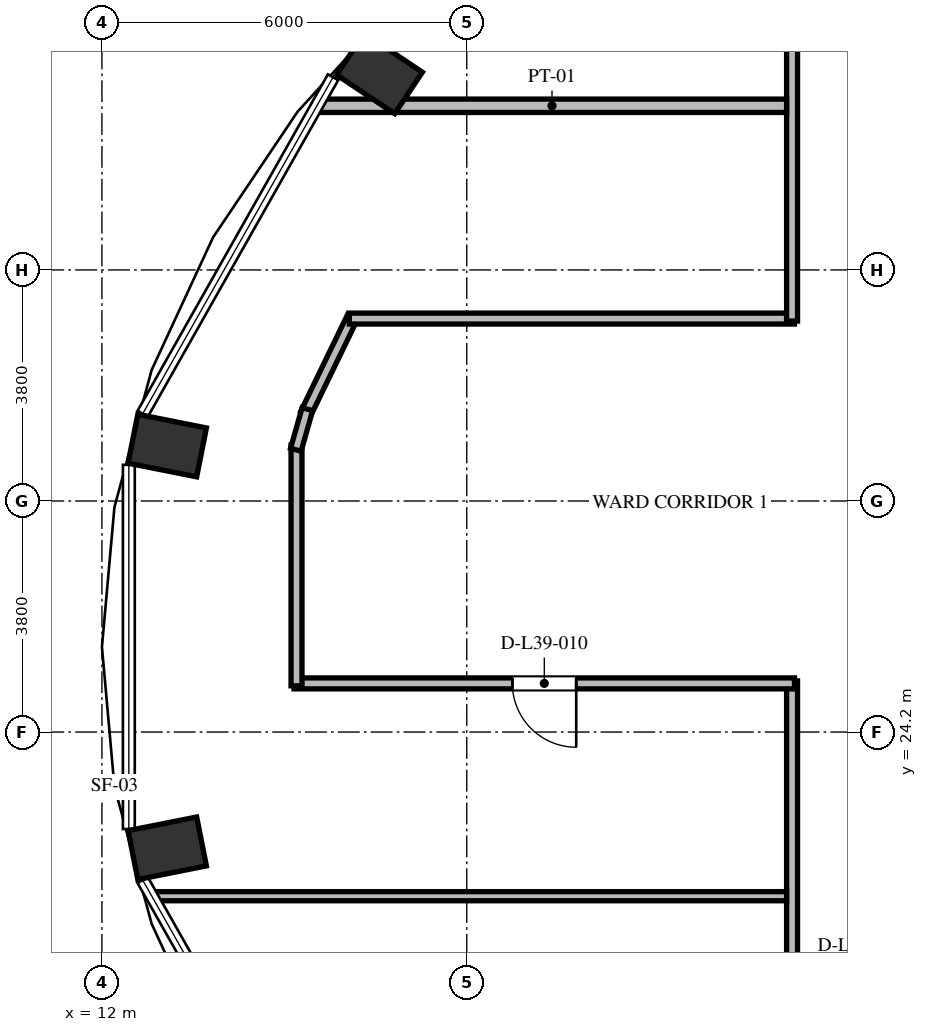
"""IFC4 building model, lengths in metres.
Left out: names, types, materials, properties, quantities, classifications, styles, units other than length and angle.
Written with IfcOpenShell. Run it as: python <this file> out.ifc"""

import sys

from ifc_helpers import new_model, si_unit, direction, frame, frame_2d, origin, origin_2d, place, context, subcontext, project, spatial, rectangle, extrude, element, fill, save


model = new_model("IFC4")
c1 = context("Model", 3, precision=1e-05, world=origin(), true_north=direction((0.0, 1.0)))
c2 = subcontext(c1, "Body", "Model", "MODEL_VIEW")
j1 = project(units=[si_unit("LENGTHUNIT", "METRE"), si_unit("PLANEANGLEUNIT", "RADIAN")], contexts=[c1])
p1 = place(None, origin())
s1 = spatial("IfcSite", under=j1, at=p1, CompositionType="ELEMENT")
p2 = place(p1, origin())
s2 = spatial("IfcBuilding", under=s1, at=p2, CompositionType="ELEMENT")
p3 = place(p2, frame((0.0, 0.0, 152.88)))
s3 = spatial("IfcBuildingStorey", under=s2, at=p3, CompositionType="ELEMENT", Elevation=152.88)
for number, where, z_axis, x_axis in (
    (1, (16.564, 35.031, 0.0), (0.0, 0.0, 1.0), (-0.831, 0.556, 0.0)),
    (2, (13.074, 28.912, 0.0), (0.0, 0.0, 1.0), (-0.981, 0.195, 0.0)),
    (3, (13.074, 22.288, 0.0), (0.0, 0.0, 1.0), (-0.981, -0.195, 0.0)),
):
    element("IfcColumn", number, at=place(p3, frame(where, z_axis=z_axis, x_axis=x_axis)), inside=s3, PredefinedType="COLUMN", context=c2, shape_type="SweptSolid", body=[
        extrude(rectangle(XDim=1.15, YDim=0.82, at=origin_2d()), origin(), (0.0, 0.0, 1.0), 3.648),
    ])
p4 = place(p3, frame((15.35, 29.436, 0.0), z_axis=(0.0, 0.0, 1.0), x_axis=(0.436196025907, 0.899851669434, 0.0)))
e4 = element("IfcWall", 4, at=p4, inside=s3, PredefinedType="PARTITIONING", context=c2, shape_type="SweptSolid", body=[
    extrude(rectangle(XDim=1.778, YDim=0.18, at=frame_2d((0.889, 0.0))), origin(), (0.0, 0.0, 1.0), 3.428),
])
p5 = place(p3, frame((16.068, 31.0, 0.0), z_axis=(0.0, 0.0, 1.0), x_axis=(1.0, 0.0, 0.0)))
e5 = element("IfcWall", 5, at=p5, inside=s3, PredefinedType="PARTITIONING", context=c2, shape_type="SweptSolid", body=[
    extrude(rectangle(XDim=7.322, YDim=0.18, at=frame_2d((3.661, 0.0))), origin(), (0.0, 0.0, 1.0), 3.428),
])
p6 = place(p3, frame((23.35, 30.96, 0.0), z_axis=(0.0, 0.0, 1.0), x_axis=(0.0, 1.0, 0.0)))
e6 = element("IfcWall", 6, at=p6, inside=s3, PredefinedType="PARTITIONING", context=c2, shape_type="SweptSolid", body=[
    extrude(rectangle(XDim=6.714, YDim=0.18, at=frame_2d((3.357, 0.0))), origin(), (0.0, 0.0, 1.0), 3.428),
])
p7 = place(p3, frame((23.35, 19.98, 0.0), z_axis=(0.0, 0.0, 1.0), x_axis=(0.0, 1.0, 0.0)))
e7 = element("IfcWall", 7, at=p7, inside=s3, PredefinedType="PARTITIONING", context=c2, shape_type="SweptSolid", body=[
    extrude(rectangle(XDim=5.06, YDim=0.18, at=frame_2d((2.53, 0.0))), origin(), (0.0, 0.0, 1.0), 3.428),
])
p8 = place(p3, frame((23.39, 25.0, 0.0), z_axis=(0.0, 0.0, 1.0), x_axis=(-1.0, 0.0, 0.0)))
e8 = element("IfcWall", 8, at=p8, inside=s3, PredefinedType="PARTITIONING", context=c2, shape_type="SweptSolid", body=[
    extrude(rectangle(XDim=8.23, YDim=0.18, at=frame_2d((4.115, 0.0))), origin(), (0.0, 0.0, 1.0), 3.428),
])
p9 = place(p8, frame((3.59, 0.0, 0.0)))
e9 = element("IfcOpeningElement", 9, at=p9, cuts=e8, PredefinedType="OPENING", context=c2, shape_type="SweptSolid", body=[
    extrude(rectangle(XDim=1.05, YDim=2.15, at=frame_2d((0.525, 1.075))), frame((0.0, 0.1, 0.0), z_axis=(0.0, -1.0, 0.0), x_axis=(1.0, 0.0, 0.0)), (0.0, 0.0, 1.0), 0.2),
])
p10 = place(p3, frame((15.2, 24.96, 0.0), z_axis=(0.0, 0.0, 1.0), x_axis=(0.0, 1.0, 0.0)))
e10 = element("IfcWall", 10, at=p10, inside=s3, PredefinedType="PARTITIONING", context=c2, shape_type="SweptSolid", body=[
    extrude(rectangle(XDim=3.961, YDim=0.18, at=frame_2d((1.98, 0.0))), origin(), (0.0, 0.0, 1.0), 3.428),
])
p11 = place(p3, frame((15.189, 28.843, 0.0), z_axis=(0.0, 0.0, 1.0), x_axis=(0.272862960331, 0.962052911684, 0.0)))
e11 = element("IfcWall", 11, at=p11, inside=s3, PredefinedType="PARTITIONING", context=c2, shape_type="SweptSolid", body=[
    extrude(rectangle(XDim=0.694, YDim=0.18, at=frame_2d((0.347, 0.0))), origin(), (0.0, 0.0, 1.0), 3.428),
])
p12 = place(p3, frame((12.829, 21.5, 0.0), z_axis=(0.0, 0.0, 1.0), x_axis=(1.0, 0.0, 0.0)))
e12 = element("IfcWall", 12, at=p12, inside=s3, PredefinedType="PARTITIONING", context=c2, shape_type="SweptSolid", body=[
    extrude(rectangle(XDim=10.431, YDim=0.15, at=frame_2d((5.216, 0.0))), origin(), (0.0, 0.0, 1.0), 2.863),
])
p13 = place(p3, frame((15.544, 34.5, 0.0), z_axis=(0.0, 0.0, 1.0), x_axis=(1.0, 0.0, 0.0)))
e13 = element("IfcWall", 13, at=p13, inside=s3, PredefinedType="PARTITIONING", context=c2, shape_type="SweptSolid", body=[
    extrude(rectangle(XDim=7.716, YDim=0.22, at=frame_2d((3.858, 0.0))), origin(), (0.0, 0.0, 1.0), 3.428),
])
p14 = place(p9, origin())
e14 = element("IfcDoor", 14, at=p14, inside=s3, OperationType="SINGLE_SWING_LEFT", PredefinedType="DOOR", context=c2, shape_type="SweptSolid", body=[
    extrude(rectangle(XDim=1.05, YDim=2.15, at=frame_2d((0.525, 1.075))), frame((0.0, 0.025, 0.0), z_axis=(0.0, -1.0, 0.0), x_axis=(1.0, 0.0, 0.0)), (0.0, 0.0, 1.0), 0.05),
])
fill(e9, e14)
save(model, sys.argv[1])
